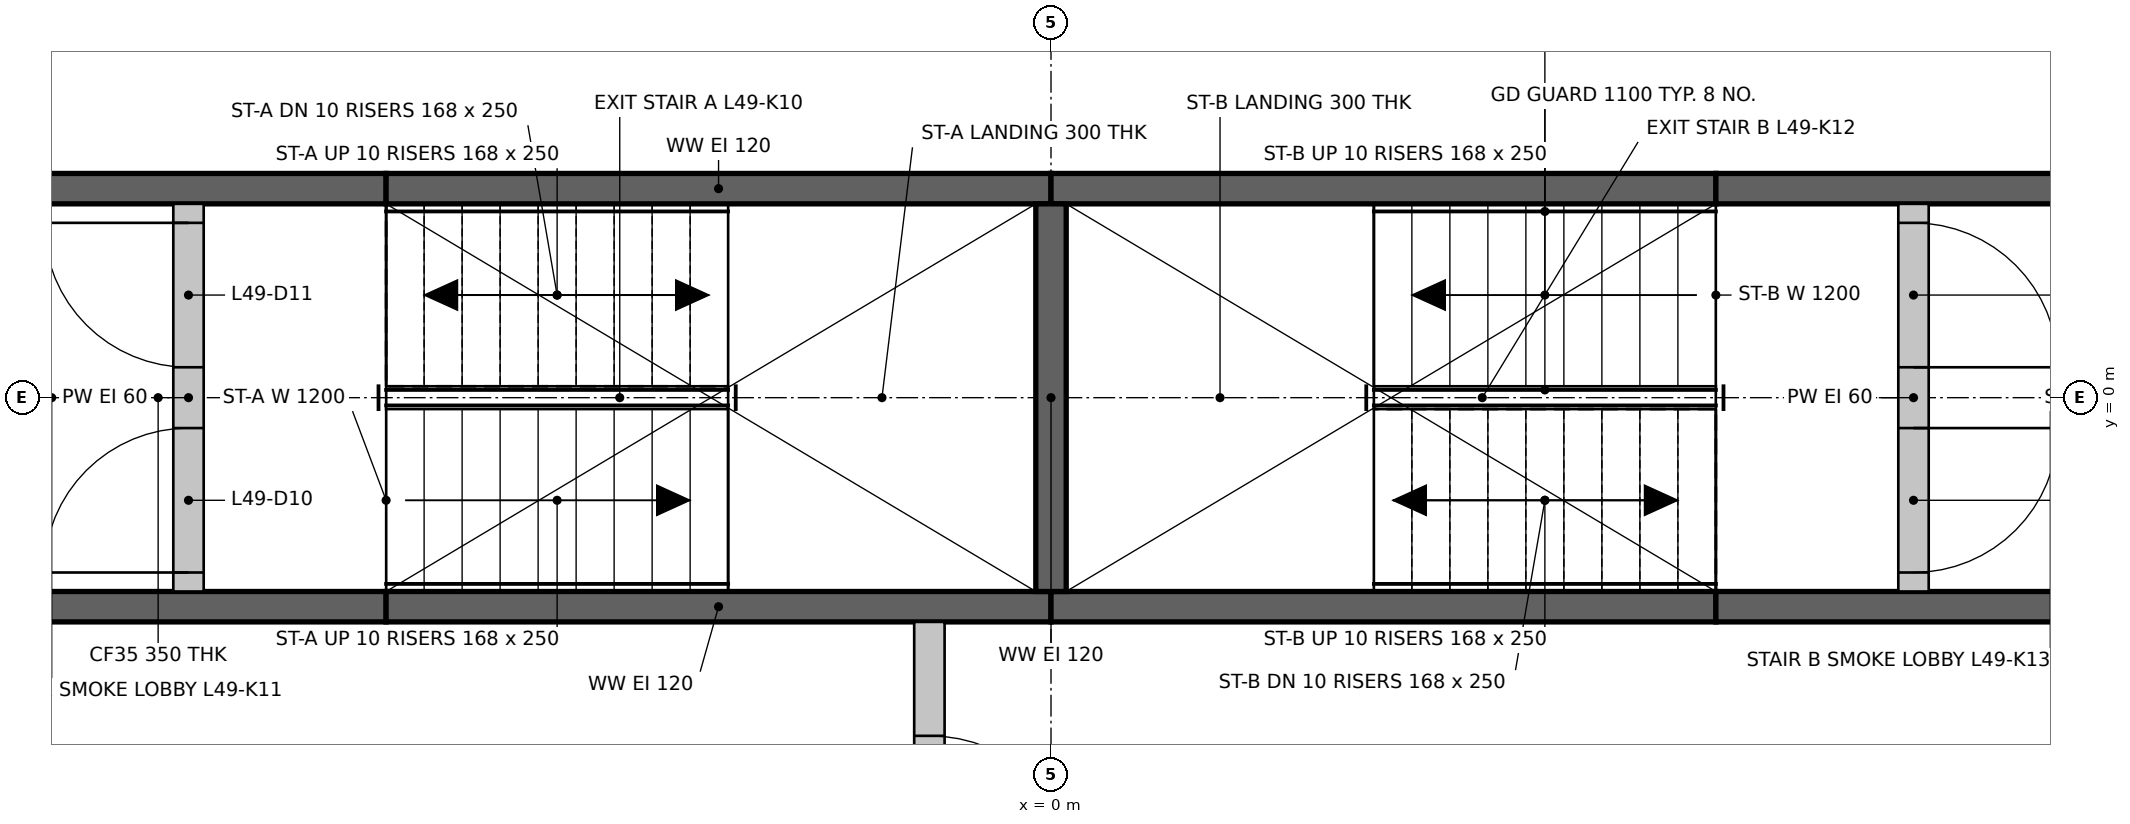
"""IFC4 building model, lengths in metres.
Left out: names, types, materials, properties, quantities, classifications, styles, units other than length and angle.
Written with IfcOpenShell. Run it as: python <this file> out.ifc"""

import sys

from ifc_helpers import new_model, si_unit, direction, frame, frame_2d, origin, place, context, subcontext, project, spatial, rectangle, extrude, element, fill, save


model = new_model("IFC4")
c1 = context("Model", 3, precision=1e-05, world=origin(), true_north=direction((0.0, 1.0)))
c2 = subcontext(c1, "Body", "Model", "MODEL_VIEW")
j1 = project(units=[si_unit("LENGTHUNIT", "METRE"), si_unit("PLANEANGLEUNIT", "RADIAN")], contexts=[c1])
p1 = place(None, origin())
s1 = spatial("IfcSite", under=j1, at=p1, CompositionType="ELEMENT")
p2 = place(p1, origin())
s2 = spatial("IfcBuilding", under=s1, at=p2, CompositionType="ELEMENT")
p3 = place(p2, frame((0.0, 0.0, 184.3)))
s3 = spatial("IfcBuildingStorey", under=s2, at=p3, CompositionType="ELEMENT", Elevation=184.3)
p4 = place(p3, frame((-7.374, -1.375, 0.0), z_axis=(0.0, 0.0, 1.0), x_axis=(1.0, 0.0, 0.0)))
e1 = element("IfcWall", 1, at=p4, inside=s3, PredefinedType="SHEAR", context=c2, shape_type="SweptSolid", body=[
    extrude(rectangle(XDim=3.0, YDim=0.2, at=frame_2d((1.5, 0.0))), origin(), (0.0, 0.0, 1.0), 3.0),
])
for number, where, z_axis, x_axis in (
    (2, (-4.374, -1.375, 0.0), (0.0, 0.0, 1.0), (1.0, 0.0, 0.0)),
    (3, (0.0, -1.375, 0.0), (0.0, 0.0, 1.0), (1.0, 0.0, 0.0)),
):
    element("IfcWall", number, at=place(p3, frame(where, z_axis=z_axis, x_axis=x_axis)), inside=s3, PredefinedType="SHEAR", context=c2, shape_type="SweptSolid", body=[
        extrude(rectangle(XDim=4.374, YDim=0.2, at=frame_2d((2.187, 0.0))), origin(), (0.0, 0.0, 1.0), 3.0),
    ])
for number, where, z_axis, x_axis in (
    (4, (4.374, -1.375, 0.0), (0.0, 0.0, 1.0), (1.0, 0.0, 0.0)),
    (5, (-7.374, 1.375, 0.0), (0.0, 0.0, 1.0), (1.0, 0.0, 0.0)),
):
    element("IfcWall", number, at=place(p3, frame(where, z_axis=z_axis, x_axis=x_axis)), inside=s3, PredefinedType="SHEAR", context=c2, shape_type="SweptSolid", body=[
        extrude(rectangle(XDim=3.0, YDim=0.2, at=frame_2d((1.5, 0.0))), origin(), (0.0, 0.0, 1.0), 3.0),
    ])
for number, where, z_axis, x_axis in (
    (6, (-4.374, 1.375, 0.0), (0.0, 0.0, 1.0), (1.0, 0.0, 0.0)),
    (7, (0.0, 1.375, 0.0), (0.0, 0.0, 1.0), (1.0, 0.0, 0.0)),
):
    element("IfcWall", number, at=place(p3, frame(where, z_axis=z_axis, x_axis=x_axis)), inside=s3, PredefinedType="SHEAR", context=c2, shape_type="SweptSolid", body=[
        extrude(rectangle(XDim=4.374, YDim=0.2, at=frame_2d((2.187, 0.0))), origin(), (0.0, 0.0, 1.0), 3.0),
    ])
p5 = place(p3, frame((4.374, 1.375, 0.0), z_axis=(0.0, 0.0, 1.0), x_axis=(1.0, 0.0, 0.0)))
e8 = element("IfcWall", 8, at=p5, inside=s3, PredefinedType="SHEAR", context=c2, shape_type="SweptSolid", body=[
    extrude(rectangle(XDim=3.0, YDim=0.2, at=frame_2d((1.5, 0.0))), origin(), (0.0, 0.0, 1.0), 3.0),
])
p6 = place(p3, frame((0.0, -1.275, 0.0), z_axis=(0.0, 0.0, 1.0), x_axis=(0.0, 1.0, 0.0)))
e9 = element("IfcWall", 9, at=p6, inside=s3, PredefinedType="SHEAR", context=c2, shape_type="SweptSolid", body=[
    extrude(rectangle(XDim=2.55, YDim=0.2, at=frame_2d((1.275, 0.0))), origin(), (0.0, 0.0, 1.0), 3.0),
])
p7 = place(p3, frame((-0.8, -3.974, 0.0), z_axis=(0.0, 0.0, 1.0), x_axis=(0.0, 1.0, 0.0)))
e10 = element("IfcWall", 10, at=p7, inside=s3, PredefinedType="PARTITIONING", context=c2, shape_type="SweptSolid", body=[
    extrude(rectangle(XDim=2.499, YDim=0.2, at=frame_2d((1.25, 0.0))), origin(), (0.0, 0.0, 1.0), 3.0),
])
p8 = place(p7, frame((0.75, 0.0, 0.0)))
e11 = element("IfcOpeningElement", 11, at=p8, cuts=e10, PredefinedType="OPENING", context=c2, shape_type="SweptSolid", body=[
    extrude(rectangle(XDim=1.0, YDim=2.1, at=frame_2d((0.5, 1.05))), frame((0.0, 0.11, 0.0), z_axis=(0.0, -1.0, 0.0), x_axis=(1.0, 0.0, 0.0)), (0.0, 0.0, 1.0), 0.22),
])
p9 = place(p3, frame((-5.674, -1.275, 0.0), z_axis=(0.0, 0.0, 1.0), x_axis=(0.0, 1.0, 0.0)))
e12 = element("IfcWall", 12, at=p9, inside=s3, PredefinedType="PARTITIONING", context=c2, shape_type="SweptSolid", body=[
    extrude(rectangle(XDim=2.55, YDim=0.2, at=frame_2d((1.275, 0.0))), origin(), (0.0, 0.0, 1.0), 3.0),
])
p10 = place(p9, frame((0.125, 0.0, 0.0)))
e13 = element("IfcOpeningElement", 13, at=p10, cuts=e12, PredefinedType="OPENING", context=c2, shape_type="SweptSolid", body=[
    extrude(rectangle(XDim=0.95, YDim=2.1, at=frame_2d((0.475, 1.05))), frame((0.0, 0.11, 0.0), z_axis=(0.0, -1.0, 0.0), x_axis=(1.0, 0.0, 0.0)), (0.0, 0.0, 1.0), 0.22),
])
p11 = place(p9, frame((1.475, 0.0, 0.0)))
e14 = element("IfcOpeningElement", 14, at=p11, cuts=e12, PredefinedType="OPENING", context=c2, shape_type="SweptSolid", body=[
    extrude(rectangle(XDim=0.95, YDim=2.1, at=frame_2d((0.475, 1.05))), frame((0.0, 0.11, 0.0), z_axis=(0.0, -1.0, 0.0), x_axis=(1.0, 0.0, 0.0)), (0.0, 0.0, 1.0), 0.22),
])
p12 = place(p3, frame((5.674, -1.275, 0.0), z_axis=(0.0, 0.0, 1.0), x_axis=(0.0, 1.0, 0.0)))
e15 = element("IfcWall", 15, at=p12, inside=s3, PredefinedType="PARTITIONING", context=c2, shape_type="SweptSolid", body=[
    extrude(rectangle(XDim=2.55, YDim=0.2, at=frame_2d((1.275, 0.0))), origin(), (0.0, 0.0, 1.0), 3.0),
])
p13 = place(p12, frame((0.125, 0.0, 0.0)))
e16 = element("IfcOpeningElement", 16, at=p13, cuts=e15, PredefinedType="OPENING", context=c2, shape_type="SweptSolid", body=[
    extrude(rectangle(XDim=0.95, YDim=2.1, at=frame_2d((0.475, 1.05))), frame((0.0, 0.11, 0.0), z_axis=(0.0, -1.0, 0.0), x_axis=(1.0, 0.0, 0.0)), (0.0, 0.0, 1.0), 0.22),
])
p14 = place(p12, frame((1.475, 0.0, 0.0)))
e17 = element("IfcOpeningElement", 17, at=p14, cuts=e15, PredefinedType="OPENING", context=c2, shape_type="SweptSolid", body=[
    extrude(rectangle(XDim=0.95, YDim=2.1, at=frame_2d((0.475, 1.05))), frame((0.0, 0.11, 0.0), z_axis=(0.0, -1.0, 0.0), x_axis=(1.0, 0.0, 0.0)), (0.0, 0.0, 1.0), 0.22),
])
p15 = place(p10, origin())
e18 = element("IfcDoor", 18, at=p15, inside=s3, OperationType="SINGLE_SWING_LEFT", PredefinedType="DOOR", context=c2, shape_type="SweptSolid", body=[
    extrude(rectangle(XDim=0.95, YDim=2.1, at=frame_2d((0.475, 1.05))), frame((0.0, 0.025, 0.0), z_axis=(0.0, -1.0, 0.0), x_axis=(1.0, 0.0, 0.0)), (0.0, 0.0, 1.0), 0.05),
])
fill(e13, e18)
p16 = place(p11, origin())
e19 = element("IfcDoor", 19, at=p16, inside=s3, OperationType="SINGLE_SWING_RIGHT", PredefinedType="DOOR", context=c2, shape_type="SweptSolid", body=[
    extrude(rectangle(XDim=0.95, YDim=2.1, at=frame_2d((0.475, 1.05))), frame((0.0, 0.025, 0.0), z_axis=(0.0, -1.0, 0.0), x_axis=(1.0, 0.0, 0.0)), (0.0, 0.0, 1.0), 0.05),
])
fill(e14, e19)
p17 = place(p13, frame((0.95, 0.0, 0.0), z_axis=(0.0, 0.0, 1.0), x_axis=(-1.0, 0.0, 0.0)))
e20 = element("IfcDoor", 20, at=p17, inside=s3, OperationType="SINGLE_SWING_RIGHT", PredefinedType="DOOR", context=c2, shape_type="SweptSolid", body=[
    extrude(rectangle(XDim=0.95, YDim=2.1, at=frame_2d((0.475, 1.05))), frame((0.0, 0.025, 0.0), z_axis=(0.0, -1.0, 0.0), x_axis=(1.0, 0.0, 0.0)), (0.0, 0.0, 1.0), 0.05),
])
fill(e16, e20)
p18 = place(p14, frame((0.95, 0.0, 0.0), z_axis=(0.0, 0.0, 1.0), x_axis=(-1.0, 0.0, 0.0)))
e21 = element("IfcDoor", 21, at=p18, inside=s3, OperationType="SINGLE_SWING_LEFT", PredefinedType="DOOR", context=c2, shape_type="SweptSolid", body=[
    extrude(rectangle(XDim=0.95, YDim=2.1, at=frame_2d((0.475, 1.05))), frame((0.0, 0.025, 0.0), z_axis=(0.0, -1.0, 0.0), x_axis=(1.0, 0.0, 0.0)), (0.0, 0.0, 1.0), 0.05),
])
fill(e17, e21)
p19 = place(p8, frame((1.0, 0.0, 0.0), z_axis=(0.0, 0.0, 1.0), x_axis=(-1.0, 0.0, 0.0)))
e22 = element("IfcDoor", 22, at=p19, inside=s3, OperationType="SINGLE_SWING_LEFT", PredefinedType="DOOR", context=c2, shape_type="SweptSolid", body=[
    extrude(rectangle(XDim=1.0, YDim=2.1, at=frame_2d((0.5, 1.05))), frame((0.0, 0.025, 0.0), z_axis=(0.0, -1.0, 0.0), x_axis=(1.0, 0.0, 0.0)), (0.0, 0.0, 1.0), 0.05),
])
fill(e11, e22)
save(model, sys.argv[1])
